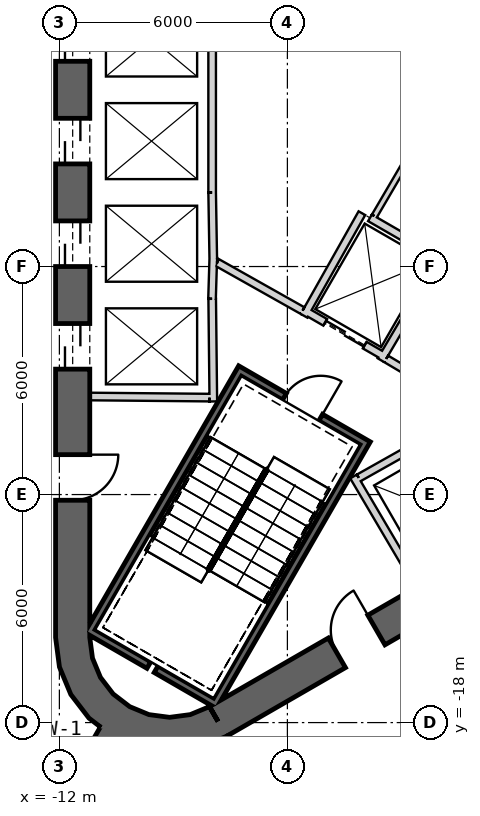
"""IFC4 building model, lengths in metres.
Left out: names, types, materials, properties, quantities, classifications, styles, units other than length and angle.
Written with IfcOpenShell. Run it as: python <this file> out.ifc"""

import sys

from ifc_helpers import new_model, si_unit, direction, frame, frame_2d, origin, place, context, subcontext, project, spatial, polyline, rectangle, outline, extrude, element, fill, save


model = new_model("IFC4")
c1 = context("Model", 3, precision=1e-05, world=origin(), true_north=direction((0.0, 1.0)))
c2 = subcontext(c1, "Body", "Model", "MODEL_VIEW")
j1 = project(units=[si_unit("LENGTHUNIT", "METRE"), si_unit("PLANEANGLEUNIT", "RADIAN")], contexts=[c1])
p1 = place(None, origin())
s1 = spatial("IfcSite", under=j1, at=p1, CompositionType="ELEMENT")
p2 = place(p1, origin())
s2 = spatial("IfcBuilding", under=s1, at=p2, CompositionType="ELEMENT")
p3 = place(p2, frame((0.0, 0.0, 9.0)))
s3 = spatial("IfcBuildingStorey", under=s2, at=p3, CompositionType="ELEMENT", Elevation=9.0)
p4 = place(p3, frame((-11.65, 15.762, 0.0), z_axis=(0.0, 0.0, 1.0), x_axis=(0.0, -1.0, 0.0)))
e1 = element("IfcWall", 1, at=p4, inside=s3, PredefinedType="SHEAR", context=c2, shape_type="SweptSolid", body=[
    extrude(rectangle(XDim=31.523, YDim=0.9, at=frame_2d((15.762, 0.0))), origin(), (0.0, 0.0, 1.0), 6.5),
])
p5 = place(p4, frame((7.062, 0.0, 0.0)))
e2 = element("IfcOpeningElement", 2, at=p5, cuts=e1, PredefinedType="OPENING", context=c2, shape_type="SweptSolid", body=[
    extrude(rectangle(XDim=1.2, YDim=2.4, at=frame_2d((0.6, 1.2))), frame((0.0, 0.46, 0.0), z_axis=(0.0, -1.0, 0.0), x_axis=(1.0, 0.0, 0.0)), (0.0, 0.0, 1.0), 0.92),
])
p6 = place(p4, frame((9.762, 0.0, 0.0)))
e3 = element("IfcOpeningElement", 3, at=p6, cuts=e1, PredefinedType="OPENING", context=c2, shape_type="SweptSolid", body=[
    extrude(rectangle(XDim=1.2, YDim=2.4, at=frame_2d((0.6, 1.2))), frame((0.0, 0.46, 0.0), z_axis=(0.0, -1.0, 0.0), x_axis=(1.0, 0.0, 0.0)), (0.0, 0.0, 1.0), 0.92),
])
p7 = place(p4, frame((12.462, 0.0, 0.0)))
e4 = element("IfcOpeningElement", 4, at=p7, cuts=e1, PredefinedType="OPENING", context=c2, shape_type="SweptSolid", body=[
    extrude(rectangle(XDim=1.2, YDim=2.4, at=frame_2d((0.6, 1.2))), frame((0.0, 0.46, 0.0), z_axis=(0.0, -1.0, 0.0), x_axis=(1.0, 0.0, 0.0)), (0.0, 0.0, 1.0), 0.92),
])
p8 = place(p4, frame((15.162, 0.0, 0.0)))
e5 = element("IfcOpeningElement", 5, at=p8, cuts=e1, PredefinedType="OPENING", context=c2, shape_type="SweptSolid", body=[
    extrude(rectangle(XDim=1.2, YDim=2.4, at=frame_2d((0.6, 1.2))), frame((0.0, 0.46, 0.0), z_axis=(0.0, -1.0, 0.0), x_axis=(1.0, 0.0, 0.0)), (0.0, 0.0, 1.0), 0.92),
])
p9 = place(p4, frame((17.862, 0.0, 0.0)))
e6 = element("IfcOpeningElement", 6, at=p9, cuts=e1, PredefinedType="OPENING", context=c2, shape_type="SweptSolid", body=[
    extrude(rectangle(XDim=1.2, YDim=2.4, at=frame_2d((0.6, 1.2))), frame((0.0, 0.46, 0.0), z_axis=(0.0, -1.0, 0.0), x_axis=(1.0, 0.0, 0.0)), (0.0, 0.0, 1.0), 0.92),
])
p10 = place(p4, frame((20.562, 0.0, 0.0)))
e7 = element("IfcOpeningElement", 7, at=p10, cuts=e1, PredefinedType="OPENING", context=c2, shape_type="SweptSolid", body=[
    extrude(rectangle(XDim=1.2, YDim=2.4, at=frame_2d((0.6, 1.2))), frame((0.0, 0.46, 0.0), z_axis=(0.0, -1.0, 0.0), x_axis=(1.0, 0.0, 0.0)), (0.0, 0.0, 1.0), 0.92),
])
p11 = place(p4, frame((23.262, 0.0, 0.0)))
e8 = element("IfcOpeningElement", 8, at=p11, cuts=e1, PredefinedType="OPENING", context=c2, shape_type="SweptSolid", body=[
    extrude(rectangle(XDim=1.2, YDim=2.4, at=frame_2d((0.6, 1.2))), frame((0.0, 0.46, 0.0), z_axis=(0.0, -1.0, 0.0), x_axis=(1.0, 0.0, 0.0)), (0.0, 0.0, 1.0), 0.92),
])
p12 = place(p4, frame((3.612, 0.0, 0.0)))
e9 = element("IfcOpeningElement", 9, at=p12, cuts=e1, PredefinedType="OPENING", context=c2, shape_type="SweptSolid", body=[
    extrude(rectangle(XDim=1.2, YDim=2.4, at=frame_2d((0.6, 1.2))), frame((0.0, 0.46, 0.0), z_axis=(0.0, -1.0, 0.0), x_axis=(1.0, 0.0, 0.0)), (0.0, 0.0, 1.0), 0.92),
])
p13 = place(p4, frame((26.712, 0.0, 0.0)))
e10 = element("IfcOpeningElement", 10, at=p13, cuts=e1, PredefinedType="OPENING", context=c2, shape_type="SweptSolid", body=[
    extrude(rectangle(XDim=1.2, YDim=2.4, at=frame_2d((0.6, 1.2))), frame((0.0, 0.46, 0.0), z_axis=(0.0, -1.0, 0.0), x_axis=(1.0, 0.0, 0.0)), (0.0, 0.0, 1.0), 0.92),
])
p14 = place(p3, frame((-7.825, -17.97, 0.0), z_axis=(0.0, 0.0, 1.0), x_axis=(0.866028369851, 0.499994862586, 0.0)))
e11 = element("IfcWall", 11, at=p14, inside=s3, PredefinedType="SHEAR", context=c2, shape_type="SweptSolid", body=[
    extrude(rectangle(XDim=31.523, YDim=0.9, at=frame_2d((15.762, 0.0))), origin(), (0.0, 0.0, 1.0), 6.5),
])
p15 = place(p14, frame((7.062, 0.0, 0.0)))
e12 = element("IfcOpeningElement", 12, at=p15, cuts=e11, PredefinedType="OPENING", context=c2, shape_type="SweptSolid", body=[
    extrude(rectangle(XDim=1.2, YDim=2.4, at=frame_2d((0.6, 1.2))), frame((0.0, 0.46, 0.0), z_axis=(0.0, -1.0, 0.0), x_axis=(1.0, 0.0, 0.0)), (0.0, 0.0, 1.0), 0.92),
])
p16 = place(p14, frame((9.762, 0.0, 0.0)))
e13 = element("IfcOpeningElement", 13, at=p16, cuts=e11, PredefinedType="OPENING", context=c2, shape_type="SweptSolid", body=[
    extrude(rectangle(XDim=1.2, YDim=2.4, at=frame_2d((0.6, 1.2))), frame((0.0, 0.46, 0.0), z_axis=(0.0, -1.0, 0.0), x_axis=(1.0, 0.0, 0.0)), (0.0, 0.0, 1.0), 0.92),
])
p17 = place(p14, frame((12.462, 0.0, 0.0)))
e14 = element("IfcOpeningElement", 14, at=p17, cuts=e11, PredefinedType="OPENING", context=c2, shape_type="SweptSolid", body=[
    extrude(rectangle(XDim=1.2, YDim=2.4, at=frame_2d((0.6, 1.2))), frame((0.0, 0.46, 0.0), z_axis=(0.0, -1.0, 0.0), x_axis=(1.0, 0.0, 0.0)), (0.0, 0.0, 1.0), 0.92),
])
p18 = place(p14, frame((15.162, 0.0, 0.0)))
e15 = element("IfcOpeningElement", 15, at=p18, cuts=e11, PredefinedType="OPENING", context=c2, shape_type="SweptSolid", body=[
    extrude(rectangle(XDim=1.2, YDim=2.4, at=frame_2d((0.6, 1.2))), frame((0.0, 0.46, 0.0), z_axis=(0.0, -1.0, 0.0), x_axis=(1.0, 0.0, 0.0)), (0.0, 0.0, 1.0), 0.92),
])
p19 = place(p14, frame((17.862, 0.0, 0.0)))
e16 = element("IfcOpeningElement", 16, at=p19, cuts=e11, PredefinedType="OPENING", context=c2, shape_type="SweptSolid", body=[
    extrude(rectangle(XDim=1.2, YDim=2.4, at=frame_2d((0.6, 1.2))), frame((0.0, 0.46, 0.0), z_axis=(0.0, -1.0, 0.0), x_axis=(1.0, 0.0, 0.0)), (0.0, 0.0, 1.0), 0.92),
])
p20 = place(p14, frame((20.562, 0.0, 0.0)))
e17 = element("IfcOpeningElement", 17, at=p20, cuts=e11, PredefinedType="OPENING", context=c2, shape_type="SweptSolid", body=[
    extrude(rectangle(XDim=1.2, YDim=2.4, at=frame_2d((0.6, 1.2))), frame((0.0, 0.46, 0.0), z_axis=(0.0, -1.0, 0.0), x_axis=(1.0, 0.0, 0.0)), (0.0, 0.0, 1.0), 0.92),
])
p21 = place(p14, frame((26.712, 0.0, 0.0)))
e18 = element("IfcOpeningElement", 18, at=p21, cuts=e11, PredefinedType="OPENING", context=c2, shape_type="SweptSolid", body=[
    extrude(rectangle(XDim=1.2, YDim=2.4, at=frame_2d((0.6, 1.2))), frame((0.0, 0.46, 0.0), z_axis=(0.0, -1.0, 0.0), x_axis=(1.0, 0.0, 0.0)), (0.0, 0.0, 1.0), 0.92),
])
p22 = place(p14, frame((3.612, 0.0, 0.0)))
e19 = element("IfcOpeningElement", 19, at=p22, cuts=e11, PredefinedType="OPENING", context=c2, shape_type="SweptSolid", body=[
    extrude(rectangle(XDim=1.2, YDim=2.4, at=frame_2d((0.6, 1.2))), frame((0.0, 0.46, 0.0), z_axis=(0.0, -1.0, 0.0), x_axis=(1.0, 0.0, 0.0)), (0.0, 0.0, 1.0), 0.92),
])
p23 = place(p3, origin())
e20 = element("IfcWall", 20, at=p23, inside=s3, PredefinedType="SHEAR", context=c2, shape_type="SweptSolid", body=[
    extrude(outline(polyline([(-12.1, -15.762), (-11.998, -16.538), (-11.698, -17.262), (-11.221, -17.883), (-10.6, -18.36), (-9.876, -18.659), (-9.1, -18.762), (-8.323, -18.659), (-7.6, -18.36), (-8.05, -17.58), (-8.556, -17.79), (-9.1, -17.862), (-9.644, -17.79), (-10.15, -17.58), (-10.585, -17.247), (-10.919, -16.812), (-11.128, -16.305), (-11.2, -15.762), (-12.1, -15.762)])), origin(), (0.0, 0.0, 1.0), 6.5),
])
p24 = place(p3, frame((-10.575, -18.316, 0.0), z_axis=(0.0, 0.0, 1.0), x_axis=(-0.499996575515, -0.866027380903, 0.0)))
e21 = element("IfcWall", 21, at=p24, inside=s3, PredefinedType="SHEAR", context=c2, shape_type="SweptSolid", body=[
    extrude(rectangle(XDim=13.954, YDim=0.8, at=frame_2d((6.977, 0.0))), origin(), (0.0, 0.0, 1.0), 6.5),
])
p25 = place(p24, frame((2.05, 0.0, 0.0)))
e22 = element("IfcOpeningElement", 22, at=p25, cuts=e21, PredefinedType="OPENING", context=c2, shape_type="SweptSolid", body=[
    extrude(rectangle(XDim=1.4, YDim=2.4, at=frame_2d((0.7, 1.2))), frame((0.0, 0.41, 0.0), z_axis=(0.0, -1.0, 0.0), x_axis=(1.0, 0.0, 0.0)), (0.0, 0.0, 1.0), 0.82),
])
p26 = place(p3, frame((-7.98, 4.05, 0.0), z_axis=(0.0, 0.0, 1.0), x_axis=(0.0, -1.0, 0.0)))
e23 = element("IfcWall", 23, at=p26, inside=s3, PredefinedType="PLUMBINGWALL", context=c2, shape_type="SweptSolid", body=[
    extrude(rectangle(XDim=8.1, YDim=0.2, at=frame_2d((4.05, 0.0))), origin(), (0.0, 0.0, 1.0), 6.2),
])
p27 = place(p3, frame((-7.95, -5.772, 0.0), z_axis=(0.0, 0.0, 1.0), x_axis=(-0.030803413295, -0.999525462272, 0.0)))
e24 = element("IfcWall", 24, at=p27, inside=s3, PredefinedType="PLUMBINGWALL", context=c2, shape_type="SweptSolid", body=[
    extrude(rectangle(XDim=1.078, YDim=0.2, at=frame_2d((0.539, 0.0))), origin(), (0.0, 0.0, 1.0), 6.2),
])
p28 = place(p3, frame((-7.98, -4.05, 0.0), z_axis=(0.0, 0.0, 1.0), x_axis=(0.016809909365, -0.999858703491, 0.0)))
e25 = element("IfcWall", 25, at=p28, inside=s3, PredefinedType="PLUMBINGWALL", context=c2, shape_type="SweptSolid", body=[
    extrude(rectangle(XDim=1.844, YDim=0.2, at=frame_2d((0.922, 0.0))), origin(), (0.0, 0.0, 1.0), 6.2),
])
p29 = place(p3, frame((-7.979, -6.85, 0.0), z_axis=(0.0, 0.0, 1.0), x_axis=(0.011121475088, -0.999938154483, 0.0)))
e26 = element("IfcWall", 26, at=p29, inside=s3, PredefinedType="PLUMBINGWALL", context=c2, shape_type="SweptSolid", body=[
    extrude(rectangle(XDim=2.7, YDim=0.2, at=frame_2d((1.35, 0.0))), origin(), (0.0, 0.0, 1.0), 6.2),
])
p30 = place(p3, frame((-8.05, -9.449, 0.0), z_axis=(0.0, 0.0, 1.0), x_axis=(-0.999957467379, 0.009222983926, 0.0)))
e27 = element("IfcWall", 27, at=p30, inside=s3, PredefinedType="PLUMBINGWALL", context=c2, shape_type="SweptSolid", body=[
    extrude(rectangle(XDim=3.15, YDim=0.2, at=frame_2d((1.575, 0.0))), origin(), (0.0, 0.0, 1.0), 6.2),
])
p31 = place(p3, frame((-2.558, -14.409, 0.0), z_axis=(0.0, 0.0, 1.0), x_axis=(-0.507997497166, 0.861358544901, 0.0)))
e28 = element("IfcWall", 28, at=p31, inside=s3, PredefinedType="PLUMBINGWALL", context=c2, shape_type="SweptSolid", body=[
    extrude(rectangle(XDim=3.35, YDim=0.2, at=frame_2d((1.675, 0.0))), origin(), (0.0, 0.0, 1.0), 6.2),
])
p32 = place(p3, frame((-1.769, -10.237, 0.0), z_axis=(0.0, 0.0, 1.0), x_axis=(-0.871534483978, -0.490334215854, 0.0)))
e29 = element("IfcWall", 29, at=p32, inside=s3, PredefinedType="PLUMBINGWALL", context=c2, shape_type="SweptSolid", body=[
    extrude(rectangle(XDim=2.7, YDim=0.2, at=frame_2d((1.35, 0.0))), origin(), (0.0, 0.0, 1.0), 6.2),
])
p33 = place(p3, frame((-3.905, -10.563, -0.3), z_axis=(0.0, 0.0, 1.0), x_axis=(-0.500012932018, -0.866017937352, 0.0)))
e30 = element("IfcWall", 30, at=p33, inside=s3, PredefinedType="SHEAR", context=c2, shape_type="SweptSolid", body=[
    extrude(rectangle(XDim=8.1, YDim=0.2, at=frame_2d((4.05, 0.0))), origin(), (0.0, 0.0, 1.0), 6.5),
])
p34 = place(p3, frame((-11.282, -15.541, -0.3), z_axis=(0.0, 0.0, 1.0), x_axis=(0.866000578957, -0.500042995397, 0.0)))
e31 = element("IfcWall", 31, at=p34, inside=s3, PredefinedType="SHEAR", context=c2, shape_type="SweptSolid", body=[
    extrude(rectangle(XDim=1.89, YDim=0.2, at=frame_2d((0.945, 0.0))), origin(), (0.0, 0.0, 1.0), 6.5),
])
p35 = place(p3, frame((-9.455, -16.596, -0.3), z_axis=(0.0, 0.0, 1.0), x_axis=(0.866038843867, -0.499976720371, 0.0)))
e32 = element("IfcWall", 32, at=p35, inside=s3, PredefinedType="SHEAR", context=c2, shape_type="SweptSolid", body=[
    extrude(rectangle(XDim=1.69, YDim=0.2, at=frame_2d((0.845, 0.0))), origin(), (0.0, 0.0, 1.0), 6.5),
])
p36 = place(p3, frame((-7.196, -8.663, -0.3), z_axis=(0.0, 0.0, 1.0), x_axis=(-0.499997992926, -0.866026562566, 0.0)))
e33 = element("IfcWall", 33, at=p36, inside=s3, PredefinedType="SHEAR", context=c2, shape_type="SweptSolid", body=[
    extrude(rectangle(XDim=7.9, YDim=0.2, at=frame_2d((3.95, 0.0))), origin(), (0.0, 0.0, 1.0), 6.5),
])
p37 = place(p3, frame((-4.041, -10.599, -0.3), z_axis=(0.0, 0.0, 1.0), x_axis=(-0.866047807691, 0.499961193289, 0.0)))
e34 = element("IfcWall", 34, at=p37, inside=s3, PredefinedType="SHEAR", context=c2, shape_type="SweptSolid", body=[
    extrude(rectangle(XDim=3.6, YDim=0.2, at=frame_2d((1.8, 0.0))), origin(), (0.0, 0.0, 1.0), 6.5),
])
p38 = place(p37, frame((1.25, 0.0, 0.3)))
e35 = element("IfcOpeningElement", 35, at=p38, cuts=e34, PredefinedType="OPENING", context=c2, shape_type="SweptSolid", body=[
    extrude(rectangle(XDim=1.1, YDim=2.1, at=frame_2d((0.55, 1.05))), frame((0.0, 0.11, 0.0), z_axis=(0.0, -1.0, 0.0), x_axis=(1.0, 0.0, 0.0)), (0.0, 0.0, 1.0), 0.22),
])
p39 = place(p3, frame((-3.446, -8.368, 0.0), z_axis=(0.0, 0.0, 1.0), x_axis=(-0.866024647952, 0.500001309137, 0.0)))
e36 = element("IfcWall", 36, at=p39, inside=s3, PredefinedType="PLUMBINGWALL", context=c2, shape_type="SweptSolid", body=[
    extrude(rectangle(XDim=2.4, YDim=0.2, at=frame_2d((1.2, 0.0))), origin(), (0.0, 0.0, 1.0), 6.2),
])
p40 = place(p39, frame((0.6, 0.0, 0.0)))
e37 = element("IfcOpeningElement", 37, at=p40, cuts=e36, PredefinedType="OPENING", context=c2, shape_type="SweptSolid", body=[
    extrude(rectangle(XDim=1.2, YDim=2.4, at=frame_2d((0.6, 1.2))), frame((0.0, 0.11, 0.0), z_axis=(0.0, -1.0, 0.0), x_axis=(1.0, 0.0, 0.0)), (0.0, 0.0, 1.0), 0.22),
])
p41 = place(p3, frame((-5.562, -7.296, 0.0), z_axis=(0.0, 0.0, 1.0), x_axis=(0.491322718731, 0.870977603649, 0.0)))
e38 = element("IfcWall", 38, at=p41, inside=s3, PredefinedType="PLUMBINGWALL", context=c2, shape_type="SweptSolid", body=[
    extrude(rectangle(XDim=3.1, YDim=0.2, at=frame_2d((1.55, 0.0))), origin(), (0.0, 0.0, 1.0), 6.2),
])
p42 = place(p3, frame((-3.827, -4.719, 0.0), z_axis=(0.0, 0.0, 1.0), x_axis=(0.866028691075, -0.499994306202, 0.0)))
e39 = element("IfcWall", 39, at=p42, inside=s3, PredefinedType="PLUMBINGWALL", context=c2, shape_type="SweptSolid", body=[
    extrude(rectangle(XDim=2.254, YDim=0.2, at=frame_2d((1.127, 0.0))), origin(), (0.0, 0.0, 1.0), 6.2),
])
p43 = place(p3, frame((-2.012, -5.882, 0.0), z_axis=(0.0, 0.0, 1.0), x_axis=(-0.508619639323, -0.860991325447, 0.0)))
e40 = element("IfcWall", 40, at=p43, inside=s3, PredefinedType="PLUMBINGWALL", context=c2, shape_type="SweptSolid", body=[
    extrude(rectangle(XDim=3.0, YDim=0.2, at=frame_2d((1.5, 0.0))), origin(), (0.0, 0.0, 1.0), 6.2),
])
p44 = place(p3, frame((-7.849, -5.894, 0.0), z_axis=(0.0, 0.0, 1.0), x_axis=(0.871340486379, -0.490678873396, 0.0)))
e41 = element("IfcWall", 41, at=p44, inside=s3, PredefinedType="PARTITIONING", context=c2, shape_type="SweptSolid", body=[
    extrude(rectangle(XDim=2.581, YDim=0.2, at=frame_2d((1.291, 0.0))), origin(), (0.0, 0.0, 1.0), 6.2),
])
p45 = place(p3, frame((-3.401, -8.43, 0.0), z_axis=(0.0, 0.0, 1.0), x_axis=(0.860598681535, -0.509283721849, 0.0)))
e42 = element("IfcWall", 42, at=p45, inside=s3, PredefinedType="PARTITIONING", context=c2, shape_type="SweptSolid", body=[
    extrude(rectangle(XDim=2.581, YDim=0.2, at=frame_2d((1.291, 0.0))), origin(), (0.0, 0.0, 1.0), 6.2),
])
p46 = place(p45, frame((0.791, 0.0, 0.0)))
e43 = element("IfcOpeningElement", 43, at=p46, cuts=e42, PredefinedType="OPENING", context=c2, shape_type="SweptSolid", body=[
    extrude(rectangle(XDim=1.0, YDim=2.1, at=frame_2d((0.5, 1.05))), frame((0.0, 0.11, 0.0), z_axis=(0.0, -1.0, 0.0), x_axis=(1.0, 0.0, 0.0)), (0.0, 0.0, 1.0), 0.22),
])
p47 = place(p3, frame((-3.711, -4.67, 0.0), z_axis=(0.0, 0.0, 1.0), x_axis=(0.505648368764, 0.86273966361, 0.0)))
e44 = element("IfcWall", 44, at=p47, inside=s3, PredefinedType="PLUMBINGWALL", context=c2, shape_type="SweptSolid", body=[
    extrude(rectangle(XDim=4.404, YDim=0.15, at=frame_2d((2.202, 0.0))), origin(), (0.0, 0.0, 1.0), 6.2),
])
p48 = place(p38, origin())
e45 = element("IfcDoor", 45, at=p48, inside=s3, OperationType="SINGLE_SWING_LEFT", PredefinedType="USERDEFINED", context=c2, shape_type="SweptSolid", body=[
    extrude(rectangle(XDim=1.1, YDim=2.1, at=frame_2d((0.55, 1.05))), frame((0.0, 0.025, 0.0), z_axis=(0.0, -1.0, 0.0), x_axis=(1.0, 0.0, 0.0)), (0.0, 0.0, 1.0), 0.05),
])
fill(e35, e45)
p49 = place(p40, origin())
e46 = element("IfcDoor", 46, at=p49, inside=s3, OperationType="SLIDING_TO_LEFT", PredefinedType="USERDEFINED", context=c2, shape_type="SweptSolid", body=[
    extrude(rectangle(XDim=1.2, YDim=2.4, at=frame_2d((0.6, 1.2))), frame((0.0, 0.025, 0.0), z_axis=(0.0, -1.0, 0.0), x_axis=(1.0, 0.0, 0.0)), (0.0, 0.0, 1.0), 0.05),
])
fill(e37, e46)
p50 = place(p8, origin())
e47 = element("IfcDoor", 47, at=p50, inside=s3, OperationType="SLIDING_TO_LEFT", PredefinedType="USERDEFINED", context=c2, shape_type="SweptSolid", body=[
    extrude(rectangle(XDim=1.2, YDim=2.4, at=frame_2d((0.6, 1.2))), frame((0.0, 0.025, 0.0), z_axis=(0.0, -1.0, 0.0), x_axis=(1.0, 0.0, 0.0)), (0.0, 0.0, 1.0), 0.05),
])
fill(e5, e47)
p51 = place(p9, origin())
e48 = element("IfcDoor", 48, at=p51, inside=s3, OperationType="SLIDING_TO_LEFT", PredefinedType="USERDEFINED", context=c2, shape_type="SweptSolid", body=[
    extrude(rectangle(XDim=1.2, YDim=2.4, at=frame_2d((0.6, 1.2))), frame((0.0, 0.025, 0.0), z_axis=(0.0, -1.0, 0.0), x_axis=(1.0, 0.0, 0.0)), (0.0, 0.0, 1.0), 0.05),
])
fill(e6, e48)
p52 = place(p10, origin())
e49 = element("IfcDoor", 49, at=p52, inside=s3, OperationType="SLIDING_TO_LEFT", PredefinedType="USERDEFINED", context=c2, shape_type="SweptSolid", body=[
    extrude(rectangle(XDim=1.2, YDim=2.4, at=frame_2d((0.6, 1.2))), frame((0.0, 0.025, 0.0), z_axis=(0.0, -1.0, 0.0), x_axis=(1.0, 0.0, 0.0)), (0.0, 0.0, 1.0), 0.05),
])
fill(e7, e49)
p53 = place(p11, origin())
e50 = element("IfcDoor", 50, at=p53, inside=s3, OperationType="SLIDING_TO_LEFT", PredefinedType="USERDEFINED", context=c2, shape_type="SweptSolid", body=[
    extrude(rectangle(XDim=1.2, YDim=2.4, at=frame_2d((0.6, 1.2))), frame((0.0, 0.025, 0.0), z_axis=(0.0, -1.0, 0.0), x_axis=(1.0, 0.0, 0.0)), (0.0, 0.0, 1.0), 0.05),
])
fill(e8, e50)
p54 = place(p13, origin())
e51 = element("IfcDoor", 51, at=p54, inside=s3, OperationType="SINGLE_SWING_LEFT", PredefinedType="USERDEFINED", context=c2, shape_type="SweptSolid", body=[
    extrude(rectangle(XDim=1.2, YDim=2.4, at=frame_2d((0.6, 1.2))), frame((0.0, 0.025, 0.0), z_axis=(0.0, -1.0, 0.0), x_axis=(1.0, 0.0, 0.0)), (0.0, 0.0, 1.0), 0.05),
])
fill(e10, e51)
p55 = place(p22, origin())
e52 = element("IfcDoor", 52, at=p55, inside=s3, OperationType="SINGLE_SWING_RIGHT", PredefinedType="USERDEFINED", context=c2, shape_type="SweptSolid", body=[
    extrude(rectangle(XDim=1.2, YDim=2.4, at=frame_2d((0.6, 1.2))), frame((0.0, 0.025, 0.0), z_axis=(0.0, -1.0, 0.0), x_axis=(1.0, 0.0, 0.0)), (0.0, 0.0, 1.0), 0.05),
])
fill(e19, e52)
save(model, sys.argv[1])
